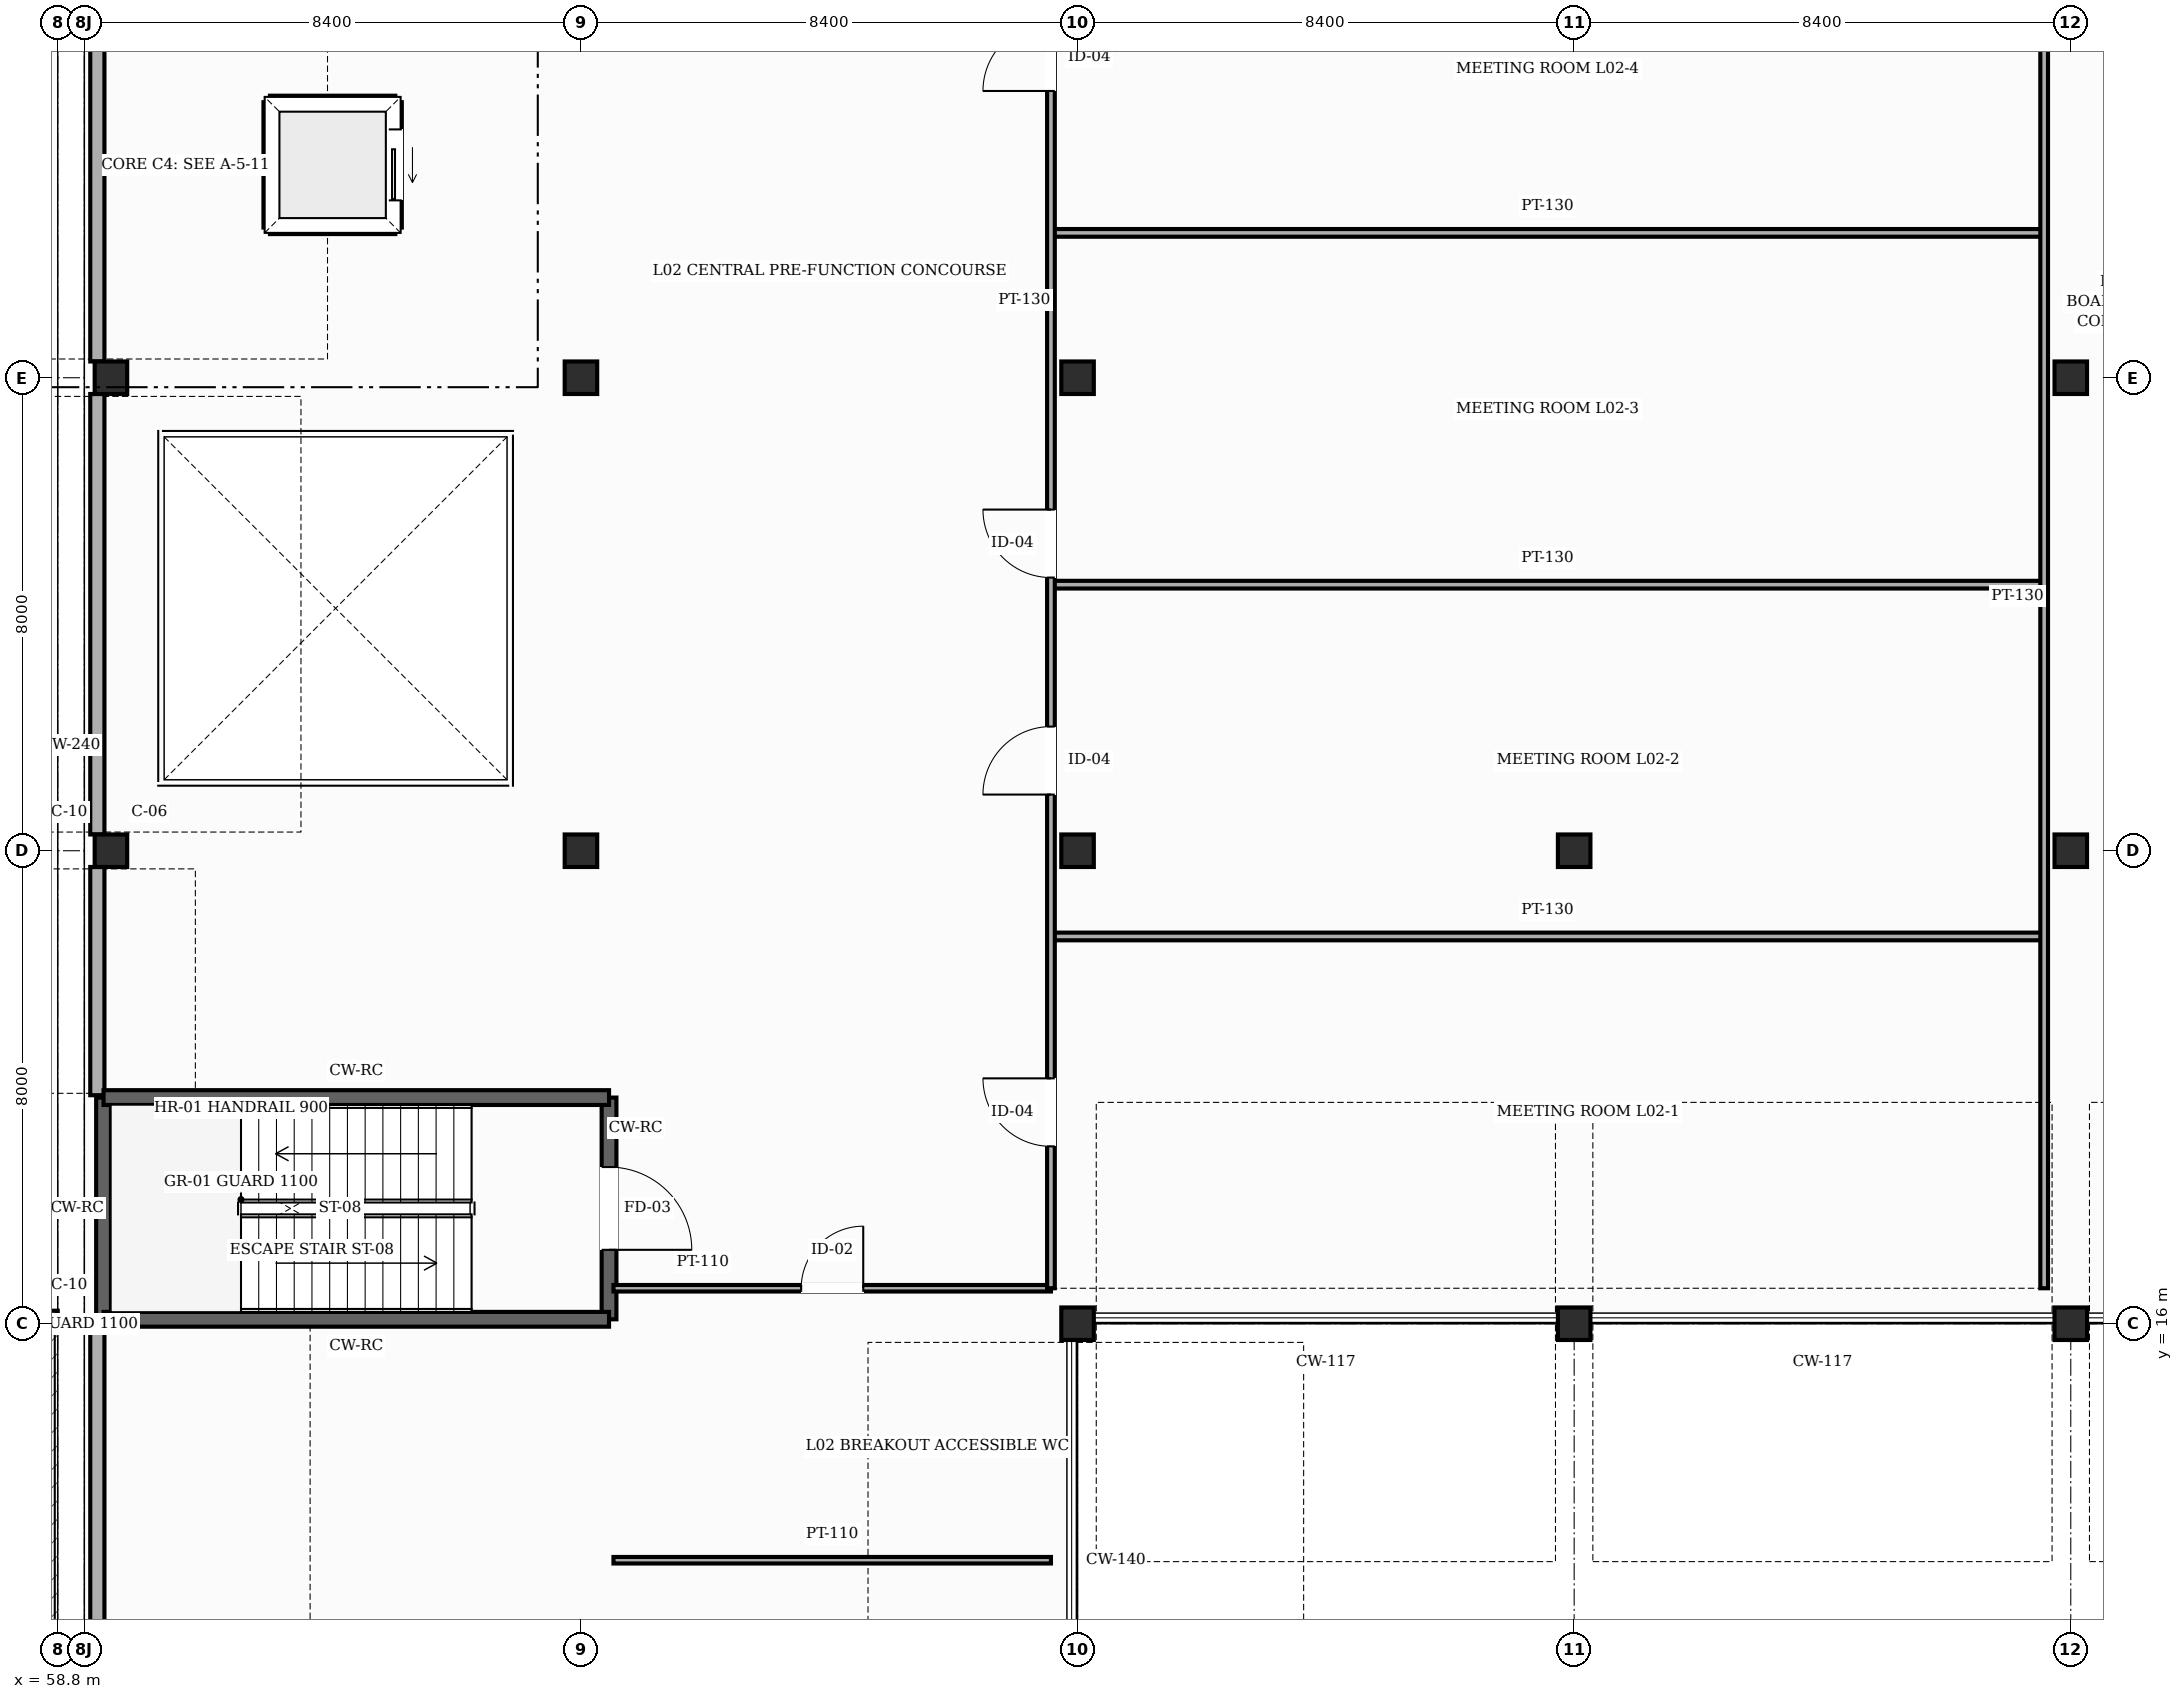
"""IFC4 building model, lengths in metres.
Left out: names, types, materials, properties, quantities, classifications, styles, units other than length and angle.
Written with IfcOpenShell. Run it as: python <this file> out.ifc"""

import sys

from ifc_helpers import new_model, si_unit, direction, frame, frame_2d, origin, origin_2d, place, context, subcontext, project, spatial, rectangle, hollow_rectangle, extrude, element, fill, save


model = new_model("IFC4")
c1 = context("Model", 3, precision=1e-05, world=origin(), true_north=direction((0.0, 1.0)))
c2 = subcontext(c1, "Body", "Model", "MODEL_VIEW")
j1 = project(units=[si_unit("LENGTHUNIT", "METRE"), si_unit("PLANEANGLEUNIT", "RADIAN")], contexts=[c1])
p1 = place(None, origin())
s1 = spatial("IfcSite", under=j1, at=p1, CompositionType="ELEMENT")
p2 = place(p1, origin())
s2 = spatial("IfcBuilding", under=s1, at=p2, CompositionType="ELEMENT")
p3 = place(p2, frame((0.0, 0.0, 10.2)))
s3 = spatial("IfcBuildingStorey", under=s2, at=p3, CompositionType="ELEMENT", Elevation=10.2)
for number, where, z_axis, x_axis in (
    (1, (59.7, 24.0, 0.0), (0.0, 0.0, 1.0), (1.0, 0.0, 0.0)),
    (2, (59.7, 32.0, 0.0), (0.0, 0.0, 1.0), (1.0, 0.0, 0.0)),
    (3, (67.65, 24.0, 0.0), (0.0, 0.0, 1.0), (1.0, 0.0, 0.0)),
    (4, (67.65, 32.0, 0.0), (0.0, 0.0, 1.0), (1.0, 0.0, 0.0)),
    (5, (76.05, 16.0, 0.0), (0.0, 0.0, 1.0), (1.0, 0.0, 0.0)),
    (6, (76.05, 24.0, 0.0), (0.0, 0.0, 1.0), (1.0, 0.0, 0.0)),
    (7, (76.05, 32.0, 0.0), (0.0, 0.0, 1.0), (1.0, 0.0, 0.0)),
    (8, (84.45, 16.0, 0.0), (0.0, 0.0, 1.0), (1.0, 0.0, 0.0)),
    (9, (84.45, 24.0, 0.0), (0.0, 0.0, 1.0), (1.0, 0.0, 0.0)),
    (10, (92.85, 16.0, 0.0), (0.0, 0.0, 1.0), (1.0, 0.0, 0.0)),
    (11, (92.85, 24.0, 0.0), (0.0, 0.0, 1.0), (1.0, 0.0, 0.0)),
    (12, (92.85, 32.0, 0.0), (0.0, 0.0, 1.0), (1.0, 0.0, 0.0)),
):
    element("IfcColumn", number, at=place(p3, frame(where, z_axis=z_axis, x_axis=x_axis)), inside=s3, PredefinedType="COLUMN", context=c2, shape_type="SweptSolid", body=[
        extrude(hollow_rectangle(XDim=0.55, YDim=0.55, WallThickness=0.022, InnerFilletRadius=0.022, OuterFilletRadius=0.044, at=origin_2d()), origin(), (0.0, 0.0, 1.0), 4.8),
    ])
p4 = place(p3, frame((58.8, 16.1, 0.0), z_axis=(0.0, 0.0, 1.0), x_axis=(-1.0, 0.0, 0.0)))
e13 = element("IfcWall", 13, at=p4, inside=s3, PredefinedType="SOLIDWALL", context=c2, shape_type="SweptSolid", body=[
    extrude(rectangle(XDim=0.36, YDim=0.24, at=frame_2d((0.18, 0.0))), origin(), (0.0, 0.0, 1.0), 4.545),
])
p5 = place(p3, frame((59.47, 8.275, 0.0), z_axis=(0.0, 0.0, 1.0), x_axis=(0.0, 1.0, 0.0)))
e14 = element("IfcWall", 14, at=p5, inside=s3, PredefinedType="SOLIDWALL", context=c2, shape_type="SweptSolid", body=[
    extrude(rectangle(XDim=7.76, YDim=0.24, at=frame_2d((3.88, 0.0))), origin(), (0.0, 0.0, 1.0), 4.545),
])
p6 = place(p3, frame((59.47, 19.865, 0.0), z_axis=(0.0, 0.0, 1.0), x_axis=(0.0, 1.0, 0.0)))
e15 = element("IfcWall", 15, at=p6, inside=s3, PredefinedType="SOLIDWALL", context=c2, shape_type="SweptSolid", body=[
    extrude(rectangle(XDim=3.86, YDim=0.24, at=frame_2d((1.93, 0.0))), origin(), (0.0, 0.0, 1.0), 4.545),
])
p7 = place(p3, frame((59.47, 24.275, 0.0), z_axis=(0.0, 0.0, 1.0), x_axis=(0.0, 1.0, 0.0)))
e16 = element("IfcWall", 16, at=p7, inside=s3, PredefinedType="SOLIDWALL", context=c2, shape_type="SweptSolid", body=[
    extrude(rectangle(XDim=7.45, YDim=0.24, at=frame_2d((3.725, 0.0))), origin(), (0.0, 0.0, 1.0), 3.885),
])
p8 = place(p3, frame((59.47, 32.275, 0.0), z_axis=(0.0, 0.0, 1.0), x_axis=(0.0, 1.0, 0.0)))
e17 = element("IfcWall", 17, at=p8, inside=s3, PredefinedType="SOLIDWALL", context=c2, shape_type="SweptSolid", body=[
    extrude(rectangle(XDim=8.35, YDim=0.24, at=frame_2d((4.175, 0.0))), origin(), (0.0, 0.0, 1.0), 3.885),
])
p9 = place(p3, frame((68.125, 19.825, 0.0), z_axis=(0.0, 0.0, 1.0), x_axis=(0.0, -1.0, 0.0)))
e18 = element("IfcWall", 18, at=p9, inside=s3, PredefinedType="SHEAR", context=c2, shape_type="SweptSolid", body=[
    extrude(rectangle(XDim=3.75, YDim=0.25, at=frame_2d((1.875, 0.0))), origin(), (0.0, 0.0, 1.0), 4.56),
])
p10 = place(p9, frame((1.175, 0.0, 0.0)))
e19 = element("IfcOpeningElement", 19, at=p10, cuts=e18, PredefinedType="OPENING", context=c2, shape_type="SweptSolid", body=[
    extrude(rectangle(XDim=1.4, YDim=2.25, at=frame_2d((0.7, 1.125))), frame((0.0, 0.135, 0.0), z_axis=(0.0, -1.0, 0.0), x_axis=(1.0, 0.0, 0.0)), (0.0, 0.0, 1.0), 0.27),
])
p11 = place(p3, frame((59.575, 16.075, 0.0), z_axis=(0.0, 0.0, 1.0), x_axis=(0.0, 1.0, 0.0)))
e20 = element("IfcWall", 20, at=p11, inside=s3, PredefinedType="SHEAR", context=c2, shape_type="SweptSolid", body=[
    extrude(rectangle(XDim=3.75, YDim=0.25, at=frame_2d((1.875, 0.0))), origin(), (0.0, 0.0, 1.0), 4.56),
])
for number, where, z_axis, x_axis in (
    (21, (59.575, 19.825, 0.0), (0.0, 0.0, 1.0), (1.0, 0.0, 0.0)),
    (22, (68.125, 16.075, 0.0), (0.0, 0.0, 1.0), (-1.0, 0.0, 0.0)),
):
    element("IfcWall", number, at=place(p3, frame(where, z_axis=z_axis, x_axis=x_axis)), inside=s3, PredefinedType="SHEAR", context=c2, shape_type="SweptSolid", body=[
        extrude(rectangle(XDim=8.55, YDim=0.25, at=frame_2d((4.275, 0.0))), origin(), (0.0, 0.0, 1.0), 4.56),
    ])
for number, where, z_axis, x_axis in (
    (23, (62.39, 36.66, 0.0), (0.0, 0.0, 1.0), (1.0, 0.0, 0.0)),
    (24, (62.39, 34.54, 0.0), (0.0, 0.0, 1.0), (1.0, 0.0, 0.0)),
):
    element("IfcWall", number, at=place(p3, frame(where, z_axis=z_axis, x_axis=x_axis)), inside=s3, PredefinedType="SHEAR", context=c2, shape_type="SweptSolid", body=[
        extrude(rectangle(XDim=2.12, YDim=0.22, at=frame_2d((1.06, 0.0))), origin(), (0.0, 0.0, 1.0), 4.56),
    ])
p12 = place(p3, frame((64.51, 34.54, 0.0), z_axis=(0.0, 0.0, 1.0), x_axis=(0.0, 1.0, 0.0)))
e25 = element("IfcWall", 25, at=p12, inside=s3, PredefinedType="SHEAR", context=c2, shape_type="SweptSolid", body=[
    extrude(rectangle(XDim=2.12, YDim=0.22, at=frame_2d((1.06, 0.0))), origin(), (0.0, 0.0, 1.0), 4.56),
])
p13 = place(p12, frame((0.46, 0.0, 0.0)))
e26 = element("IfcOpeningElement", 26, at=p13, cuts=e25, PredefinedType="OPENING", context=c2, shape_type="SweptSolid", body=[
    extrude(rectangle(XDim=1.2, YDim=2.25, at=frame_2d((0.6, 1.125))), frame((0.0, 0.12, 0.0), z_axis=(0.0, -1.0, 0.0), x_axis=(1.0, 0.0, 0.0)), (0.0, 0.0, 1.0), 0.24),
])
p14 = place(p3, frame((62.39, 34.54, 0.0), z_axis=(0.0, 0.0, 1.0), x_axis=(0.0, 1.0, 0.0)))
e27 = element("IfcWall", 27, at=p14, inside=s3, PredefinedType="SHEAR", context=c2, shape_type="SweptSolid", body=[
    extrude(rectangle(XDim=2.12, YDim=0.22, at=frame_2d((1.06, 0.0))), origin(), (0.0, 0.0, 1.0), 4.56),
])
p15 = place(p3, frame((68.2, 12.0, 0.0), z_axis=(0.0, 0.0, 1.0), x_axis=(1.0, 0.0, 0.0)))
e28 = element("IfcWall", 28, at=p15, inside=s3, PredefinedType="PARTITIONING", context=c2, shape_type="SweptSolid", body=[
    extrude(rectangle(XDim=7.4, YDim=0.11, at=frame_2d((3.7, 0.0))), origin(), (0.0, 0.0, 1.0), 4.545),
])
p16 = place(p3, frame((68.2, 16.6, 0.0), z_axis=(0.0, 0.0, 1.0), x_axis=(1.0, 0.0, 0.0)))
e29 = element("IfcWall", 29, at=p16, inside=s3, PredefinedType="PARTITIONING", context=c2, shape_type="SweptSolid", body=[
    extrude(rectangle(XDim=7.4, YDim=0.11, at=frame_2d((3.7, 0.0))), origin(), (0.0, 0.0, 1.0), 4.545),
])
p17 = place(p16, frame((3.175, 0.0, 0.0)))
e30 = element("IfcOpeningElement", 30, at=p17, cuts=e29, PredefinedType="OPENING", context=c2, shape_type="SweptSolid", body=[
    extrude(rectangle(XDim=1.05, YDim=2.2, at=frame_2d((0.525, 1.1))), frame((0.0, 0.065, 0.0), z_axis=(0.0, -1.0, 0.0), x_axis=(1.0, 0.0, 0.0)), (0.0, 0.0, 1.0), 0.13),
])
for number, where, z_axis, x_axis in (
    (31, (75.6, 22.55, 0.0), (0.0, 0.0, 1.0), (1.0, 0.0, 0.0)),
    (32, (75.6, 28.5, 0.0), (0.0, 0.0, 1.0), (1.0, 0.0, 0.0)),
    (33, (75.6, 34.45, 0.0), (0.0, 0.0, 1.0), (1.0, 0.0, 0.0)),
):
    element("IfcWall", number, at=place(p3, frame(where, z_axis=z_axis, x_axis=x_axis)), inside=s3, PredefinedType="PARTITIONING", context=c2, shape_type="SweptSolid", body=[
        extrude(rectangle(XDim=16.8, YDim=0.13, at=frame_2d((8.4, 0.0))), origin(), (0.0, 0.0, 1.0), 4.545),
    ])
p18 = place(p3, frame((75.6, 16.6, 0.0), z_axis=(0.0, 0.0, 1.0), x_axis=(0.0, 1.0, 0.0)))
e34 = element("IfcWall", 34, at=p18, inside=s3, PredefinedType="PARTITIONING", context=c2, shape_type="SweptSolid", body=[
    extrude(rectangle(XDim=35.7, YDim=0.13, at=frame_2d((17.85, 0.0))), origin(), (0.0, 0.0, 1.0), 4.545),
])
p19 = place(p18, frame((2.4, 0.0, 0.0)))
e35 = element("IfcOpeningElement", 35, at=p19, cuts=e34, PredefinedType="OPENING", context=c2, shape_type="SweptSolid", body=[
    extrude(rectangle(XDim=1.15, YDim=2.22, at=frame_2d((0.575, 1.11))), frame((0.0, 0.075, 0.0), z_axis=(0.0, -1.0, 0.0), x_axis=(1.0, 0.0, 0.0)), (0.0, 0.0, 1.0), 0.15),
])
p20 = place(p18, frame((8.35, 0.0, 0.0)))
e36 = element("IfcOpeningElement", 36, at=p20, cuts=e34, PredefinedType="OPENING", context=c2, shape_type="SweptSolid", body=[
    extrude(rectangle(XDim=1.15, YDim=2.22, at=frame_2d((0.575, 1.11))), frame((0.0, 0.075, 0.0), z_axis=(0.0, -1.0, 0.0), x_axis=(1.0, 0.0, 0.0)), (0.0, 0.0, 1.0), 0.15),
])
p21 = place(p18, frame((12.02, 0.0, 0.0)))
e37 = element("IfcOpeningElement", 37, at=p21, cuts=e34, PredefinedType="OPENING", context=c2, shape_type="SweptSolid", body=[
    extrude(rectangle(XDim=1.15, YDim=2.22, at=frame_2d((0.575, 1.11))), frame((0.0, 0.075, 0.0), z_axis=(0.0, -1.0, 0.0), x_axis=(1.0, 0.0, 0.0)), (0.0, 0.0, 1.0), 0.15),
])
p22 = place(p18, frame((20.25, 0.0, 0.0)))
e38 = element("IfcOpeningElement", 38, at=p22, cuts=e34, PredefinedType="OPENING", context=c2, shape_type="SweptSolid", body=[
    extrude(rectangle(XDim=1.15, YDim=2.22, at=frame_2d((0.575, 1.11))), frame((0.0, 0.075, 0.0), z_axis=(0.0, -1.0, 0.0), x_axis=(1.0, 0.0, 0.0)), (0.0, 0.0, 1.0), 0.15),
])
p23 = place(p18, frame((26.2, 0.0, 0.0)))
e39 = element("IfcOpeningElement", 39, at=p23, cuts=e34, PredefinedType="OPENING", context=c2, shape_type="SweptSolid", body=[
    extrude(rectangle(XDim=1.15, YDim=2.22, at=frame_2d((0.575, 1.11))), frame((0.0, 0.075, 0.0), z_axis=(0.0, -1.0, 0.0), x_axis=(1.0, 0.0, 0.0)), (0.0, 0.0, 1.0), 0.15),
])
p24 = place(p18, frame((34.43, 0.0, 0.0)))
e40 = element("IfcOpeningElement", 40, at=p24, cuts=e34, PredefinedType="OPENING", context=c2, shape_type="SweptSolid", body=[
    extrude(rectangle(XDim=1.15, YDim=2.22, at=frame_2d((0.575, 1.11))), frame((0.0, 0.075, 0.0), z_axis=(0.0, -1.0, 0.0), x_axis=(1.0, 0.0, 0.0)), (0.0, 0.0, 1.0), 0.15),
])
p25 = place(p3, frame((92.4, 16.6, 0.0), z_axis=(0.0, 0.0, 1.0), x_axis=(0.0, 1.0, 0.0)))
e41 = element("IfcWall", 41, at=p25, inside=s3, PredefinedType="PARTITIONING", context=c2, shape_type="SweptSolid", body=[
    extrude(rectangle(XDim=35.7, YDim=0.13, at=frame_2d((17.85, 0.0))), origin(), (0.0, 0.0, 1.0), 4.545),
])
p26 = place(p10, origin())
e42 = element("IfcDoor", 42, at=p26, inside=s3, OperationType="SINGLE_SWING_RIGHT", PredefinedType="DOOR", context=c2, shape_type="SweptSolid", body=[
    extrude(rectangle(XDim=1.4, YDim=2.25, at=frame_2d((0.7, 1.125))), frame((0.0, 0.025, 0.0), z_axis=(0.0, -1.0, 0.0), x_axis=(1.0, 0.0, 0.0)), (0.0, 0.0, 1.0), 0.05),
])
fill(e19, e42)
p27 = place(p13, origin())
e43 = element("IfcDoor", 43, at=p27, inside=s3, OperationType="SLIDING_TO_LEFT", PredefinedType="DOOR", context=c2, shape_type="SweptSolid", body=[
    extrude(rectangle(XDim=1.2, YDim=2.25, at=frame_2d((0.6, 1.125))), frame((0.0, 0.025, 0.0), z_axis=(0.0, -1.0, 0.0), x_axis=(1.0, 0.0, 0.0)), (0.0, 0.0, 1.0), 0.05),
])
fill(e26, e43)
p28 = place(p19, origin())
e44 = element("IfcDoor", 44, at=p28, inside=s3, OperationType="SINGLE_SWING_RIGHT", PredefinedType="DOOR", context=c2, shape_type="SweptSolid", body=[
    extrude(rectangle(XDim=1.15, YDim=2.22, at=frame_2d((0.575, 1.11))), frame((0.0, 0.025, 0.0), z_axis=(0.0, -1.0, 0.0), x_axis=(1.0, 0.0, 0.0)), (0.0, 0.0, 1.0), 0.05),
])
fill(e35, e44)
p29 = place(p20, origin())
e45 = element("IfcDoor", 45, at=p29, inside=s3, OperationType="SINGLE_SWING_LEFT", PredefinedType="DOOR", context=c2, shape_type="SweptSolid", body=[
    extrude(rectangle(XDim=1.15, YDim=2.22, at=frame_2d((0.575, 1.11))), frame((0.0, 0.025, 0.0), z_axis=(0.0, -1.0, 0.0), x_axis=(1.0, 0.0, 0.0)), (0.0, 0.0, 1.0), 0.05),
])
fill(e36, e45)
p30 = place(p21, origin())
e46 = element("IfcDoor", 46, at=p30, inside=s3, OperationType="SINGLE_SWING_RIGHT", PredefinedType="DOOR", context=c2, shape_type="SweptSolid", body=[
    extrude(rectangle(XDim=1.15, YDim=2.22, at=frame_2d((0.575, 1.11))), frame((0.0, 0.025, 0.0), z_axis=(0.0, -1.0, 0.0), x_axis=(1.0, 0.0, 0.0)), (0.0, 0.0, 1.0), 0.05),
])
fill(e37, e46)
p31 = place(p22, origin())
e47 = element("IfcDoor", 47, at=p31, inside=s3, OperationType="SINGLE_SWING_LEFT", PredefinedType="DOOR", context=c2, shape_type="SweptSolid", body=[
    extrude(rectangle(XDim=1.15, YDim=2.22, at=frame_2d((0.575, 1.11))), frame((0.0, 0.025, 0.0), z_axis=(0.0, -1.0, 0.0), x_axis=(1.0, 0.0, 0.0)), (0.0, 0.0, 1.0), 0.05),
])
fill(e38, e47)
p32 = place(p17, origin())
e48 = element("IfcDoor", 48, at=p32, inside=s3, OperationType="SINGLE_SWING_RIGHT", PredefinedType="DOOR", context=c2, shape_type="SweptSolid", body=[
    extrude(rectangle(XDim=1.05, YDim=2.2, at=frame_2d((0.525, 1.1))), frame((0.0, 0.025, 0.0), z_axis=(0.0, -1.0, 0.0), x_axis=(1.0, 0.0, 0.0)), (0.0, 0.0, 1.0), 0.05),
])
fill(e30, e48)
save(model, sys.argv[1])
